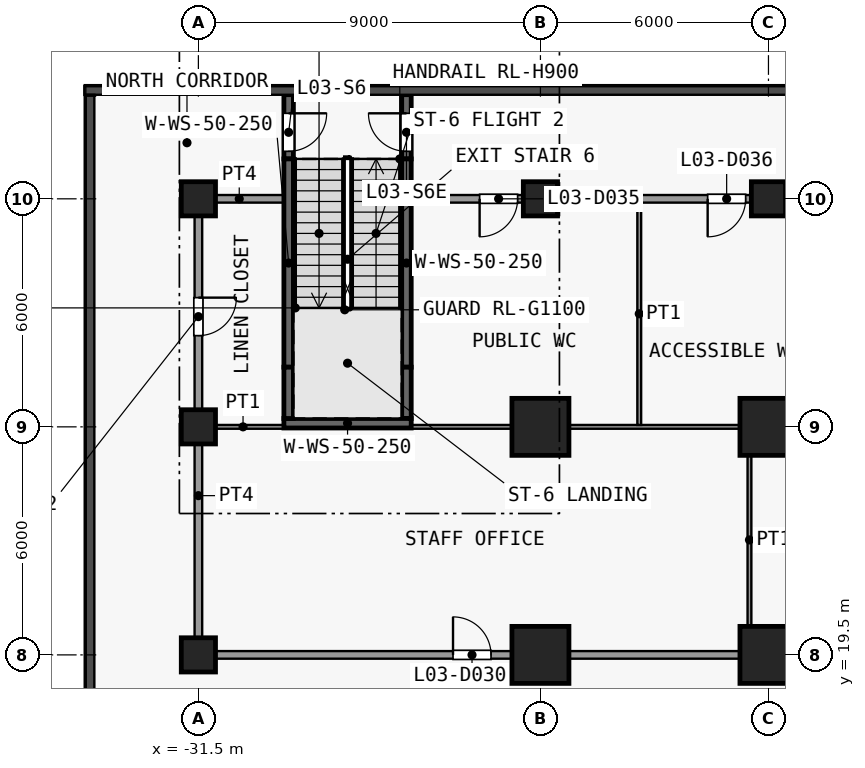
"""IFC4 building model, lengths in metres.
Left out: names, types, materials, properties, quantities, classifications, styles, units other than length and angle.
Written with IfcOpenShell. Run it as: python <this file> out.ifc"""

import sys

from ifc_helpers import new_model, si_unit, direction, frame, frame_2d, origin, origin_2d, place, context, subcontext, project, spatial, rectangle, extrude, element, fill, save


model = new_model("IFC4")
c1 = context("Model", 3, precision=1e-05, world=origin(), true_north=direction((0.0, 1.0)))
c2 = subcontext(c1, "Body", "Model", "MODEL_VIEW")
j1 = project(units=[si_unit("LENGTHUNIT", "METRE"), si_unit("PLANEANGLEUNIT", "RADIAN")], contexts=[c1])
p1 = place(None, origin())
s1 = spatial("IfcSite", under=j1, at=p1, CompositionType="ELEMENT")
p2 = place(p1, origin())
s2 = spatial("IfcBuilding", under=s1, at=p2, CompositionType="ELEMENT")
p3 = place(p2, frame((0.0, 0.0, 18.5)))
s3 = spatial("IfcBuildingStorey", under=s2, at=p3, CompositionType="ELEMENT", Elevation=18.5)
for number, where, z_axis, x_axis in (
    (1, (-31.5, 19.5, 0.0), (0.0, 0.0, 1.0), (1.0, 0.0, 0.0)),
    (2, (-31.5, 25.5, 0.0), (0.0, 0.0, 1.0), (1.0, 0.0, 0.0)),
    (3, (-31.5, 31.5, 0.0), (0.0, 0.0, 1.0), (1.0, 0.0, 0.0)),
):
    element("IfcColumn", number, at=place(p3, frame(where, z_axis=z_axis, x_axis=x_axis)), inside=s3, PredefinedType="COLUMN", context=c2, shape_type="SweptSolid", body=[
        extrude(rectangle(XDim=0.9, YDim=0.9, at=origin_2d()), origin(), (0.0, 0.0, 1.0), 5.0),
    ])
for number, where, z_axis, x_axis in (
    (4, (-22.5, 19.5, 0.0), (0.0, 0.0, 1.0), (1.0, 0.0, 0.0)),
    (5, (-22.5, 25.5, 0.0), (0.0, 0.0, 1.0), (1.0, 0.0, 0.0)),
):
    element("IfcColumn", number, at=place(p3, frame(where, z_axis=z_axis, x_axis=x_axis)), inside=s3, PredefinedType="COLUMN", context=c2, shape_type="SweptSolid", body=[
        extrude(rectangle(XDim=1.5, YDim=1.5, at=origin_2d()), origin(), (0.0, 0.0, 1.0), 5.0),
    ])
p4 = place(p3, frame((-22.5, 31.5, 0.0), z_axis=(0.0, 0.0, 1.0), x_axis=(1.0, 0.0, 0.0)))
e6 = element("IfcColumn", 6, at=p4, inside=s3, PredefinedType="COLUMN", context=c2, shape_type="SweptSolid", body=[
    extrude(rectangle(XDim=0.9, YDim=0.9, at=origin_2d()), origin(), (0.0, 0.0, 1.0), 5.0),
])
for number, where, z_axis, x_axis in (
    (7, (-16.5, 19.5, 0.0), (0.0, 0.0, 1.0), (1.0, 0.0, 0.0)),
    (8, (-16.5, 25.5, 0.0), (0.0, 0.0, 1.0), (1.0, 0.0, 0.0)),
):
    element("IfcColumn", number, at=place(p3, frame(where, z_axis=z_axis, x_axis=x_axis)), inside=s3, PredefinedType="COLUMN", context=c2, shape_type="SweptSolid", body=[
        extrude(rectangle(XDim=1.5, YDim=1.5, at=origin_2d()), origin(), (0.0, 0.0, 1.0), 5.0),
    ])
p5 = place(p3, frame((-16.5, 31.5, 0.0), z_axis=(0.0, 0.0, 1.0), x_axis=(1.0, 0.0, 0.0)))
e9 = element("IfcColumn", 9, at=p5, inside=s3, PredefinedType="COLUMN", context=c2, shape_type="SweptSolid", body=[
    extrude(rectangle(XDim=0.9, YDim=0.9, at=origin_2d()), origin(), (0.0, 0.0, 1.0), 5.0),
])
p6 = place(p3, frame((-29.125, 34.24, 0.0), z_axis=(0.0, 0.0, 1.0), x_axis=(0.0, -1.0, 0.0)))
e10 = element("IfcWall", 10, at=p6, inside=s3, PredefinedType="SHEAR", context=c2, shape_type="SweptSolid", body=[
    extrude(rectangle(XDim=1.69, YDim=0.25, at=frame_2d((0.845, 0.0))), origin(), (0.0, 0.0, 1.0), 4.65),
])
p7 = place(p6, frame((0.49, 0.0, 0.0)))
e11 = element("IfcOpeningElement", 11, at=p7, cuts=e10, PredefinedType="OPENING", context=c2, shape_type="SweptSolid", body=[
    extrude(rectangle(XDim=1.0, YDim=2.1, at=frame_2d((0.5, 1.05))), frame((0.0, 0.135, 0.0), z_axis=(0.0, -1.0, 0.0), x_axis=(1.0, 0.0, 0.0)), (0.0, 0.0, 1.0), 0.27),
])
p8 = place(p3, frame((-29.125, 27.07, 0.0), z_axis=(0.0, 0.0, 1.0), x_axis=(0.0, 1.0, 0.0)))
e12 = element("IfcWall", 12, at=p8, inside=s3, PredefinedType="SHEAR", context=c2, shape_type="SweptSolid", body=[
    extrude(rectangle(XDim=5.48, YDim=0.25, at=frame_2d((2.74, 0.0))), origin(), (0.0, 0.0, 1.0), 4.65),
])
p9 = place(p3, frame((-29.125, 25.72, 0.0), z_axis=(0.0, 0.0, 1.0), x_axis=(0.0, 1.0, 0.0)))
e13 = element("IfcWall", 13, at=p9, inside=s3, PredefinedType="SHEAR", context=c2, shape_type="SweptSolid", body=[
    extrude(rectangle(XDim=1.35, YDim=0.25, at=frame_2d((0.675, 0.0))), origin(), (0.0, 0.0, 1.0), 4.65),
])
p10 = place(p3, frame((-26.025, 32.55, 0.0), z_axis=(0.0, 0.0, 1.0), x_axis=(0.0, 1.0, 0.0)))
e14 = element("IfcWall", 14, at=p10, inside=s3, PredefinedType="SHEAR", context=c2, shape_type="SweptSolid", body=[
    extrude(rectangle(XDim=1.69, YDim=0.25, at=frame_2d((0.845, 0.0))), origin(), (0.0, 0.0, 1.0), 4.65),
])
p11 = place(p10, frame((0.2, 0.0, 0.0)))
e15 = element("IfcOpeningElement", 15, at=p11, cuts=e14, PredefinedType="OPENING", context=c2, shape_type="SweptSolid", body=[
    extrude(rectangle(XDim=1.0, YDim=2.1, at=frame_2d((0.5, 1.05))), frame((0.0, 0.135, 0.0), z_axis=(0.0, -1.0, 0.0), x_axis=(1.0, 0.0, 0.0)), (0.0, 0.0, 1.0), 0.27),
])
p12 = place(p3, frame((-26.025, 27.07, 0.0), z_axis=(0.0, 0.0, 1.0), x_axis=(0.0, 1.0, 0.0)))
e16 = element("IfcWall", 16, at=p12, inside=s3, PredefinedType="SHEAR", context=c2, shape_type="SweptSolid", body=[
    extrude(rectangle(XDim=5.48, YDim=0.25, at=frame_2d((2.74, 0.0))), origin(), (0.0, 0.0, 1.0), 4.65),
])
p13 = place(p3, frame((-26.025, 25.72, 0.0), z_axis=(0.0, 0.0, 1.0), x_axis=(0.0, 1.0, 0.0)))
e17 = element("IfcWall", 17, at=p13, inside=s3, PredefinedType="SHEAR", context=c2, shape_type="SweptSolid", body=[
    extrude(rectangle(XDim=1.35, YDim=0.25, at=frame_2d((0.675, 0.0))), origin(), (0.0, 0.0, 1.0), 4.65),
])
p14 = place(p3, frame((-29.25, 25.595, 0.0), z_axis=(0.0, 0.0, 1.0), x_axis=(1.0, 0.0, 0.0)))
e18 = element("IfcWall", 18, at=p14, inside=s3, PredefinedType="SHEAR", context=c2, shape_type="SweptSolid", body=[
    extrude(rectangle(XDim=3.35, YDim=0.25, at=frame_2d((1.675, 0.0))), origin(), (0.0, 0.0, 1.0), 4.65),
])
p15 = place(p3, frame((-31.6, 19.5, 0.0), z_axis=(0.0, 0.0, 1.0), x_axis=(1.0, 0.0, 0.0)))
e19 = element("IfcWall", 19, at=p15, inside=s3, PredefinedType="PARTITIONING", context=c2, shape_type="SweptSolid", body=[
    extrude(rectangle(XDim=60.1, YDim=0.2, at=frame_2d((30.05, 0.0))), origin(), (0.0, 0.0, 1.0), 4.65),
])
p16 = place(p15, frame((6.8, 0.0, 0.0)))
e20 = element("IfcOpeningElement", 20, at=p16, cuts=e19, PredefinedType="OPENING", context=c2, shape_type="SweptSolid", body=[
    extrude(rectangle(XDim=1.0, YDim=2.1, at=frame_2d((0.5, 1.05))), frame((0.0, 0.11, 0.0), z_axis=(0.0, -1.0, 0.0), x_axis=(1.0, 0.0, 0.0)), (0.0, 0.0, 1.0), 0.22),
])
p17 = place(p15, frame((18.3, 0.0, 0.0)))
e21 = element("IfcOpeningElement", 21, at=p17, cuts=e19, PredefinedType="OPENING", context=c2, shape_type="SweptSolid", body=[
    extrude(rectangle(XDim=1.0, YDim=2.1, at=frame_2d((0.5, 1.05))), frame((0.0, 0.11, 0.0), z_axis=(0.0, -1.0, 0.0), x_axis=(1.0, 0.0, 0.0)), (0.0, 0.0, 1.0), 0.22),
])
p18 = place(p15, frame((30.9, 0.0, 0.0)))
e22 = element("IfcOpeningElement", 22, at=p18, cuts=e19, PredefinedType="OPENING", context=c2, shape_type="SweptSolid", body=[
    extrude(rectangle(XDim=1.0, YDim=2.1, at=frame_2d((0.5, 1.05))), frame((0.0, 0.11, 0.0), z_axis=(0.0, -1.0, 0.0), x_axis=(1.0, 0.0, 0.0)), (0.0, 0.0, 1.0), 0.22),
])
p19 = place(p15, frame((40.0, 0.0, 0.0)))
e23 = element("IfcOpeningElement", 23, at=p19, cuts=e19, PredefinedType="OPENING", context=c2, shape_type="SweptSolid", body=[
    extrude(rectangle(XDim=1.0, YDim=2.1, at=frame_2d((0.5, 1.05))), frame((0.0, 0.11, 0.0), z_axis=(0.0, -1.0, 0.0), x_axis=(1.0, 0.0, 0.0)), (0.0, 0.0, 1.0), 0.22),
])
p20 = place(p15, frame((55.0, 0.0, 0.0)))
e24 = element("IfcOpeningElement", 24, at=p20, cuts=e19, PredefinedType="OPENING", context=c2, shape_type="SweptSolid", body=[
    extrude(rectangle(XDim=1.0, YDim=2.1, at=frame_2d((0.5, 1.05))), frame((0.0, 0.11, 0.0), z_axis=(0.0, -1.0, 0.0), x_axis=(1.0, 0.0, 0.0)), (0.0, 0.0, 1.0), 0.22),
])
p21 = place(p3, frame((-31.4, 25.5, 0.0), z_axis=(0.0, 0.0, 1.0), x_axis=(1.0, 0.0, 0.0)))
e25 = element("IfcWall", 25, at=p21, inside=s3, PredefinedType="PARTITIONING", context=c2, shape_type="SweptSolid", body=[
    extrude(rectangle(XDim=2.15, YDim=0.1, at=frame_2d((1.075, 0.0))), origin(), (0.0, 0.0, 1.0), 4.65),
])
p22 = place(p3, frame((-25.9, 25.5, 0.0), z_axis=(0.0, 0.0, 1.0), x_axis=(1.0, 0.0, 0.0)))
e26 = element("IfcWall", 26, at=p22, inside=s3, PredefinedType="PARTITIONING", context=c2, shape_type="SweptSolid", body=[
    extrude(rectangle(XDim=78.15, YDim=0.1, at=frame_2d((39.075, 0.0))), origin(), (0.0, 0.0, 1.0), 4.65),
])
p23 = place(p3, frame((-31.6, 31.5, 0.0), z_axis=(0.0, 0.0, 1.0), x_axis=(1.0, 0.0, 0.0)))
e27 = element("IfcWall", 27, at=p23, inside=s3, PredefinedType="PARTITIONING", context=c2, shape_type="SweptSolid", body=[
    extrude(rectangle(XDim=2.35, YDim=0.2, at=frame_2d((1.175, 0.0))), origin(), (0.0, 0.0, 1.0), 4.65),
])
p24 = place(p3, frame((-25.9, 31.5, 0.0), z_axis=(0.0, 0.0, 1.0), x_axis=(1.0, 0.0, 0.0)))
e28 = element("IfcWall", 28, at=p24, inside=s3, PredefinedType="PARTITIONING", context=c2, shape_type="SweptSolid", body=[
    extrude(rectangle(XDim=78.15, YDim=0.2, at=frame_2d((39.075, 0.0))), origin(), (0.0, 0.0, 1.0), 4.65),
])
p25 = place(p24, frame((1.8, 0.0, 0.0)))
e29 = element("IfcOpeningElement", 29, at=p25, cuts=e28, PredefinedType="OPENING", context=c2, shape_type="SweptSolid", body=[
    extrude(rectangle(XDim=1.0, YDim=2.1, at=frame_2d((0.5, 1.05))), frame((0.0, 0.11, 0.0), z_axis=(0.0, -1.0, 0.0), x_axis=(1.0, 0.0, 0.0)), (0.0, 0.0, 1.0), 0.22),
])
p26 = place(p24, frame((7.8, 0.0, 0.0)))
e30 = element("IfcOpeningElement", 30, at=p26, cuts=e28, PredefinedType="OPENING", context=c2, shape_type="SweptSolid", body=[
    extrude(rectangle(XDim=1.0, YDim=2.1, at=frame_2d((0.5, 1.05))), frame((0.0, 0.11, 0.0), z_axis=(0.0, -1.0, 0.0), x_axis=(1.0, 0.0, 0.0)), (0.0, 0.0, 1.0), 0.22),
])
p27 = place(p24, frame((18.4, 0.0, 0.0)))
e31 = element("IfcOpeningElement", 31, at=p27, cuts=e28, PredefinedType="OPENING", context=c2, shape_type="SweptSolid", body=[
    extrude(rectangle(XDim=1.0, YDim=2.1, at=frame_2d((0.5, 1.05))), frame((0.0, 0.11, 0.0), z_axis=(0.0, -1.0, 0.0), x_axis=(1.0, 0.0, 0.0)), (0.0, 0.0, 1.0), 0.22),
])
p28 = place(p24, frame((34.8, 0.0, 0.0)))
e32 = element("IfcOpeningElement", 32, at=p28, cuts=e28, PredefinedType="OPENING", context=c2, shape_type="SweptSolid", body=[
    extrude(rectangle(XDim=1.0, YDim=2.1, at=frame_2d((0.5, 1.05))), frame((0.0, 0.11, 0.0), z_axis=(0.0, -1.0, 0.0), x_axis=(1.0, 0.0, 0.0)), (0.0, 0.0, 1.0), 0.22),
])
p29 = place(p24, frame((49.6, 0.0, 0.0)))
e33 = element("IfcOpeningElement", 33, at=p29, cuts=e28, PredefinedType="OPENING", context=c2, shape_type="SweptSolid", body=[
    extrude(rectangle(XDim=1.0, YDim=2.1, at=frame_2d((0.5, 1.05))), frame((0.0, 0.11, 0.0), z_axis=(0.0, -1.0, 0.0), x_axis=(1.0, 0.0, 0.0)), (0.0, 0.0, 1.0), 0.22),
])
p30 = place(p24, frame((59.9, 0.0, 0.0)))
e34 = element("IfcOpeningElement", 34, at=p30, cuts=e28, PredefinedType="OPENING", context=c2, shape_type="SweptSolid", body=[
    extrude(rectangle(XDim=1.0, YDim=2.1, at=frame_2d((0.5, 1.05))), frame((0.0, 0.11, 0.0), z_axis=(0.0, -1.0, 0.0), x_axis=(1.0, 0.0, 0.0)), (0.0, 0.0, 1.0), 0.22),
])
p31 = place(p24, frame((73.2, 0.0, 0.0)))
e35 = element("IfcOpeningElement", 35, at=p31, cuts=e28, PredefinedType="OPENING", context=c2, shape_type="SweptSolid", body=[
    extrude(rectangle(XDim=1.0, YDim=2.1, at=frame_2d((0.5, 1.05))), frame((0.0, 0.11, 0.0), z_axis=(0.0, -1.0, 0.0), x_axis=(1.0, 0.0, 0.0)), (0.0, 0.0, 1.0), 0.22),
])
p32 = place(p3, frame((-31.5, 19.6, 0.0), z_axis=(0.0, 0.0, 1.0), x_axis=(0.0, 1.0, 0.0)))
e36 = element("IfcWall", 36, at=p32, inside=s3, PredefinedType="PARTITIONING", context=c2, shape_type="SweptSolid", body=[
    extrude(rectangle(XDim=11.8, YDim=0.2, at=frame_2d((5.9, 0.0))), origin(), (0.0, 0.0, 1.0), 4.65),
])
p33 = place(p32, frame((8.3, 0.0, 0.0)))
e37 = element("IfcOpeningElement", 37, at=p33, cuts=e36, PredefinedType="OPENING", context=c2, shape_type="SweptSolid", body=[
    extrude(rectangle(XDim=1.0, YDim=2.1, at=frame_2d((0.5, 1.05))), frame((0.0, 0.11, 0.0), z_axis=(0.0, -1.0, 0.0), x_axis=(1.0, 0.0, 0.0)), (0.0, 0.0, 1.0), 0.22),
])
for number, where, z_axis, x_axis in (
    (38, (-19.9, 25.55, 0.0), (0.0, 0.0, 1.0), (0.0, 1.0, 0.0)),
    (39, (-17.0, 19.6, 0.0), (0.0, 0.0, 1.0), (0.0, 1.0, 0.0)),
):
    element("IfcWall", number, at=place(p3, frame(where, z_axis=z_axis, x_axis=x_axis)), inside=s3, PredefinedType="PARTITIONING", context=c2, shape_type="SweptSolid", body=[
        extrude(rectangle(XDim=5.85, YDim=0.1, at=frame_2d((2.925, 0.0))), origin(), (0.0, 0.0, 1.0), 4.65),
    ])
p34 = place(p7, origin())
e40 = element("IfcDoor", 40, at=p34, inside=s3, OperationType="SINGLE_SWING_LEFT", PredefinedType="DOOR", context=c2, shape_type="SweptSolid", body=[
    extrude(rectangle(XDim=1.0, YDim=2.1, at=frame_2d((0.5, 1.05))), frame((0.0, 0.025, 0.0), z_axis=(0.0, -1.0, 0.0), x_axis=(1.0, 0.0, 0.0)), (0.0, 0.0, 1.0), 0.05),
])
fill(e11, e40)
p35 = place(p11, origin())
e41 = element("IfcDoor", 41, at=p35, inside=s3, OperationType="SINGLE_SWING_RIGHT", PredefinedType="DOOR", context=c2, shape_type="SweptSolid", body=[
    extrude(rectangle(XDim=1.0, YDim=2.1, at=frame_2d((0.5, 1.05))), frame((0.0, 0.025, 0.0), z_axis=(0.0, -1.0, 0.0), x_axis=(1.0, 0.0, 0.0)), (0.0, 0.0, 1.0), 0.05),
])
fill(e15, e41)
p36 = place(p16, origin())
e42 = element("IfcDoor", 42, at=p36, inside=s3, OperationType="SINGLE_SWING_RIGHT", PredefinedType="DOOR", context=c2, shape_type="SweptSolid", body=[
    extrude(rectangle(XDim=1.0, YDim=2.1, at=frame_2d((0.5, 1.05))), frame((0.0, 0.025, 0.0), z_axis=(0.0, -1.0, 0.0), x_axis=(1.0, 0.0, 0.0)), (0.0, 0.0, 1.0), 0.05),
])
fill(e20, e42)
p37 = place(p25, origin())
e43 = element("IfcDoor", 43, at=p37, inside=s3, OperationType="SINGLE_SWING_LEFT", PredefinedType="DOOR", context=c2, shape_type="SweptSolid", body=[
    extrude(rectangle(XDim=1.0, YDim=2.1, at=frame_2d((0.5, 1.05))), frame((0.0, 0.025, 0.0), z_axis=(0.0, -1.0, 0.0), x_axis=(1.0, 0.0, 0.0)), (0.0, 0.0, 1.0), 0.05),
])
fill(e29, e43)
p38 = place(p26, origin())
e44 = element("IfcDoor", 44, at=p38, inside=s3, OperationType="SINGLE_SWING_LEFT", PredefinedType="DOOR", context=c2, shape_type="SweptSolid", body=[
    extrude(rectangle(XDim=1.0, YDim=2.1, at=frame_2d((0.5, 1.05))), frame((0.0, 0.025, 0.0), z_axis=(0.0, -1.0, 0.0), x_axis=(1.0, 0.0, 0.0)), (0.0, 0.0, 1.0), 0.05),
])
fill(e30, e44)
p39 = place(p33, origin())
e45 = element("IfcDoor", 45, at=p39, inside=s3, OperationType="SINGLE_SWING_RIGHT", PredefinedType="DOOR", context=c2, shape_type="SweptSolid", body=[
    extrude(rectangle(XDim=1.0, YDim=2.1, at=frame_2d((0.5, 1.05))), frame((0.0, 0.025, 0.0), z_axis=(0.0, -1.0, 0.0), x_axis=(1.0, 0.0, 0.0)), (0.0, 0.0, 1.0), 0.05),
])
fill(e37, e45)
save(model, sys.argv[1])
